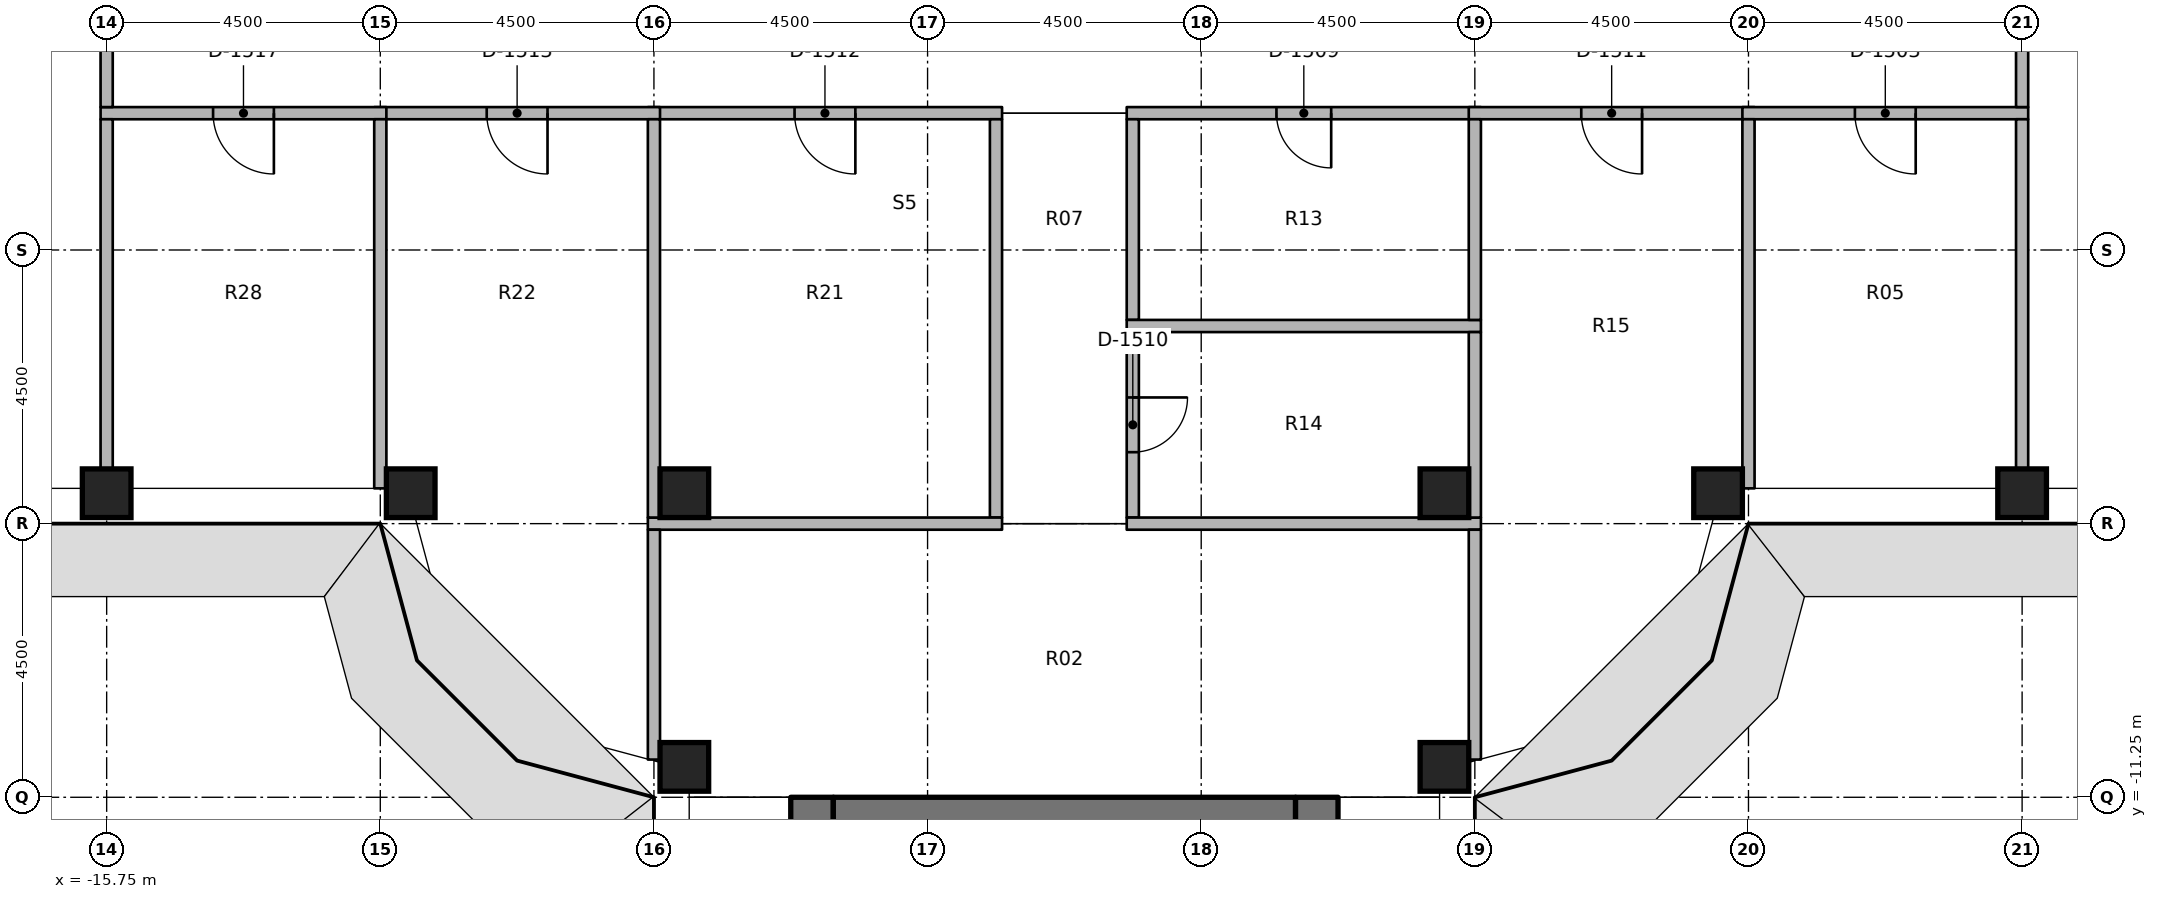
"""IFC4 building model, lengths in metres.
Left out: names, types, materials, properties, quantities, classifications, styles, units other than length and angle.
Written with IfcOpenShell. Run it as: python <this file> out.ifc"""

import sys

from ifc_helpers import new_model, si_unit, direction, frame, frame_2d, origin, origin_2d, place, context, subcontext, project, spatial, rectangle, extrude, element, fill, save


model = new_model("IFC4")
c1 = context("Model", 3, precision=1e-05, world=origin(), true_north=direction((0.0, 1.0)))
c2 = subcontext(c1, "Body", "Model", "MODEL_VIEW")
j1 = project(units=[si_unit("LENGTHUNIT", "METRE"), si_unit("PLANEANGLEUNIT", "RADIAN")], contexts=[c1])
p1 = place(None, origin())
s1 = spatial("IfcSite", under=j1, at=p1, CompositionType="ELEMENT")
p2 = place(p1, origin())
s2 = spatial("IfcBuilding", under=s1, at=p2, CompositionType="ELEMENT")
p3 = place(p2, frame((0.0, 0.0, 144.8)))
s3 = spatial("IfcBuildingStorey", under=s2, at=p3, CompositionType="ELEMENT", Elevation=144.8)
for number, where, z_axis, x_axis in (
    (1, (-15.75, -6.25, 0.0), (0.0, 0.0, 1.0), (1.0, 0.0, 0.0)),
    (2, (-10.75, -6.25, 0.0), (0.0, 0.0, 1.0), (1.0, 0.0, 0.0)),
    (3, (-6.25, -10.75, 0.0), (0.0, 0.0, 1.0), (1.0, 0.0, 0.0)),
    (4, (-6.25, -6.25, 0.0), (0.0, 0.0, 1.0), (1.0, 0.0, 0.0)),
    (5, (6.25, -10.75, 0.0), (0.0, 0.0, 1.0), (1.0, 0.0, 0.0)),
    (6, (6.25, -6.25, 0.0), (0.0, 0.0, 1.0), (1.0, 0.0, 0.0)),
    (7, (10.75, -6.25, 0.0), (0.0, 0.0, 1.0), (1.0, 0.0, 0.0)),
    (8, (15.75, -6.25, 0.0), (0.0, 0.0, 1.0), (1.0, 0.0, 0.0)),
):
    element("IfcColumn", number, at=place(p3, frame(where, z_axis=z_axis, x_axis=x_axis)), inside=s3, PredefinedType="COLUMN", context=c2, shape_type="SweptSolid", body=[
        extrude(rectangle(XDim=0.8, YDim=0.8, at=origin_2d()), origin(), (0.0, 0.0, 1.0), 3.65),
    ])
p4 = place(p3, frame((-4.15, -11.25, 0.0), z_axis=(0.0, 0.0, 1.0), x_axis=(0.0, -1.0, 0.0)))
e9 = element("IfcWall", 9, at=p4, inside=s3, PredefinedType="SHEAR", context=c2, shape_type="SweptSolid", body=[
    extrude(rectangle(XDim=15.0, YDim=0.7, at=frame_2d((7.5, 0.0))), origin(), (0.0, 0.0, 1.0), 3.8),
])
p5 = place(p4, frame((7.15, 0.0, 0.0)))
e10 = element("IfcOpeningElement", 10, at=p5, cuts=e9, PredefinedType="OPENING", context=c2, shape_type="SweptSolid", body=[
    extrude(rectangle(XDim=1.5, YDim=2.3, at=frame_2d((0.75, 1.15))), frame((0.0, 0.36, 0.0), z_axis=(0.0, -1.0, 0.0), x_axis=(1.0, 0.0, 0.0)), (0.0, 0.0, 1.0), 0.72),
])
p6 = place(p4, frame((5.55, 0.0, 0.0)))
e11 = element("IfcOpeningElement", 11, at=p6, cuts=e9, PredefinedType="OPENING", context=c2, shape_type="SweptSolid", body=[
    extrude(rectangle(XDim=1.2, YDim=2.1, at=frame_2d((0.6, 1.05))), frame((0.0, 0.36, 0.0), z_axis=(0.0, -1.0, 0.0), x_axis=(1.0, 0.0, 0.0)), (0.0, 0.0, 1.0), 0.72),
])
p7 = place(p3, frame((4.15, -11.25, 0.0), z_axis=(0.0, 0.0, 1.0), x_axis=(0.0, -1.0, 0.0)))
e12 = element("IfcWall", 12, at=p7, inside=s3, PredefinedType="SHEAR", context=c2, shape_type="SweptSolid", body=[
    extrude(rectangle(XDim=15.0, YDim=0.7, at=frame_2d((7.5, 0.0))), origin(), (0.0, 0.0, 1.0), 3.8),
])
p8 = place(p7, frame((7.15, 0.0, 0.0)))
e13 = element("IfcOpeningElement", 13, at=p8, cuts=e12, PredefinedType="OPENING", context=c2, shape_type="SweptSolid", body=[
    extrude(rectangle(XDim=1.5, YDim=2.3, at=frame_2d((0.75, 1.15))), frame((0.0, 0.36, 0.0), z_axis=(0.0, -1.0, 0.0), x_axis=(1.0, 0.0, 0.0)), (0.0, 0.0, 1.0), 0.72),
])
p9 = place(p7, frame((13.9, 0.0, 0.0)))
e14 = element("IfcOpeningElement", 14, at=p9, cuts=e12, PredefinedType="OPENING", context=c2, shape_type="SweptSolid", body=[
    extrude(rectangle(XDim=0.9, YDim=2.1, at=frame_2d((0.45, 1.05))), frame((0.0, 0.36, 0.0), z_axis=(0.0, -1.0, 0.0), x_axis=(1.0, 0.0, 0.0)), (0.0, 0.0, 1.0), 0.72),
])
p10 = place(p7, frame((1.15, 0.0, 0.0)))
e15 = element("IfcOpeningElement", 15, at=p10, cuts=e12, PredefinedType="OPENING", context=c2, shape_type="SweptSolid", body=[
    extrude(rectangle(XDim=1.2, YDim=2.1, at=frame_2d((0.6, 1.05))), frame((0.0, 0.36, 0.0), z_axis=(0.0, -1.0, 0.0), x_axis=(1.0, 0.0, 0.0)), (0.0, 0.0, 1.0), 0.72),
])
p11 = place(p3, frame((-3.8, -11.6, 0.0), z_axis=(0.0, 0.0, 1.0), x_axis=(1.0, 0.0, 0.0)))
e16 = element("IfcWall", 16, at=p11, inside=s3, PredefinedType="SHEAR", context=c2, shape_type="SweptSolid", body=[
    extrude(rectangle(XDim=7.6, YDim=0.7, at=frame_2d((3.8, 0.0))), origin(), (0.0, 0.0, 1.0), 3.8),
])
p12 = place(p3, frame((6.85, 0.0, 0.0), z_axis=(0.0, 0.0, 1.0), x_axis=(-1.0, 0.0, 0.0)))
e17 = element("IfcWall", 17, at=p12, inside=s3, PredefinedType="PARTITIONING", context=c2, shape_type="SweptSolid", body=[
    extrude(rectangle(XDim=5.825, YDim=0.2, at=frame_2d((2.913, 0.0))), origin(), (0.0, 0.0, 1.0), 2.75),
])
p13 = place(p12, frame((2.462, 0.0, 0.0)))
e18 = element("IfcOpeningElement", 18, at=p13, cuts=e17, PredefinedType="OPENING", context=c2, shape_type="SweptSolid", body=[
    extrude(rectangle(XDim=0.9, YDim=2.1, at=frame_2d((0.45, 1.05))), frame((0.0, 0.11, 0.0), z_axis=(0.0, -1.0, 0.0), x_axis=(1.0, 0.0, 0.0)), (0.0, 0.0, 1.0), 0.22),
])
p14 = place(p3, frame((11.35, 0.0, 0.0), z_axis=(0.0, 0.0, 1.0), x_axis=(-1.0, 0.0, 0.0)))
e19 = element("IfcWall", 19, at=p14, inside=s3, PredefinedType="PARTITIONING", context=c2, shape_type="SweptSolid", body=[
    extrude(rectangle(XDim=4.7, YDim=0.2, at=frame_2d((2.35, 0.0))), origin(), (0.0, 0.0, 1.0), 2.75),
])
p15 = place(p14, frame((1.85, 0.0, 0.0)))
e20 = element("IfcOpeningElement", 20, at=p15, cuts=e19, PredefinedType="OPENING", context=c2, shape_type="SweptSolid", body=[
    extrude(rectangle(XDim=1.0, YDim=2.1, at=frame_2d((0.5, 1.05))), frame((0.0, 0.11, 0.0), z_axis=(0.0, -1.0, 0.0), x_axis=(1.0, 0.0, 0.0)), (0.0, 0.0, 1.0), 0.22),
])
p16 = place(p3, frame((-1.025, 0.0, 0.0), z_axis=(0.0, 0.0, 1.0), x_axis=(-1.0, 0.0, 0.0)))
e21 = element("IfcWall", 21, at=p16, inside=s3, PredefinedType="PARTITIONING", context=c2, shape_type="SweptSolid", body=[
    extrude(rectangle(XDim=5.825, YDim=0.2, at=frame_2d((2.913, 0.0))), origin(), (0.0, 0.0, 1.0), 2.75),
])
p17 = place(p16, frame((2.413, 0.0, 0.0)))
e22 = element("IfcOpeningElement", 22, at=p17, cuts=e21, PredefinedType="OPENING", context=c2, shape_type="SweptSolid", body=[
    extrude(rectangle(XDim=1.0, YDim=2.1, at=frame_2d((0.5, 1.05))), frame((0.0, 0.11, 0.0), z_axis=(0.0, -1.0, 0.0), x_axis=(1.0, 0.0, 0.0)), (0.0, 0.0, 1.0), 0.22),
])
p18 = place(p3, frame((-6.65, 0.0, 0.0), z_axis=(0.0, 0.0, 1.0), x_axis=(-1.0, 0.0, 0.0)))
e23 = element("IfcWall", 23, at=p18, inside=s3, PredefinedType="PARTITIONING", context=c2, shape_type="SweptSolid", body=[
    extrude(rectangle(XDim=4.7, YDim=0.2, at=frame_2d((2.35, 0.0))), origin(), (0.0, 0.0, 1.0), 2.75),
])
p19 = place(p18, frame((1.85, 0.0, 0.0)))
e24 = element("IfcOpeningElement", 24, at=p19, cuts=e23, PredefinedType="OPENING", context=c2, shape_type="SweptSolid", body=[
    extrude(rectangle(XDim=1.0, YDim=2.1, at=frame_2d((0.5, 1.05))), frame((0.0, 0.11, 0.0), z_axis=(0.0, -1.0, 0.0), x_axis=(1.0, 0.0, 0.0)), (0.0, 0.0, 1.0), 0.22),
])
p20 = place(p3, frame((15.85, 0.0, 0.0), z_axis=(0.0, 0.0, 1.0), x_axis=(-1.0, 0.0, 0.0)))
e25 = element("IfcWall", 25, at=p20, inside=s3, PredefinedType="PARTITIONING", context=c2, shape_type="SweptSolid", body=[
    extrude(rectangle(XDim=4.7, YDim=0.2, at=frame_2d((2.35, 0.0))), origin(), (0.0, 0.0, 1.0), 2.75),
])
p21 = place(p20, frame((1.85, 0.0, 0.0)))
e26 = element("IfcOpeningElement", 26, at=p21, cuts=e25, PredefinedType="OPENING", context=c2, shape_type="SweptSolid", body=[
    extrude(rectangle(XDim=1.0, YDim=2.1, at=frame_2d((0.5, 1.05))), frame((0.0, 0.11, 0.0), z_axis=(0.0, -1.0, 0.0), x_axis=(1.0, 0.0, 0.0)), (0.0, 0.0, 1.0), 0.22),
])
p22 = place(p3, frame((15.75, 0.1, 0.0), z_axis=(0.0, 0.0, 1.0), x_axis=(0.0, 1.0, 0.0)))
e27 = element("IfcWall", 27, at=p22, inside=s3, PredefinedType="PARTITIONING", context=c2, shape_type="SweptSolid", body=[
    extrude(rectangle(XDim=2.05, YDim=0.2, at=frame_2d((1.025, 0.0))), origin(), (0.0, 0.0, 1.0), 2.75),
])
p23 = place(p3, frame((-11.15, 0.0, 0.0), z_axis=(0.0, 0.0, 1.0), x_axis=(-1.0, 0.0, 0.0)))
e28 = element("IfcWall", 28, at=p23, inside=s3, PredefinedType="PARTITIONING", context=c2, shape_type="SweptSolid", body=[
    extrude(rectangle(XDim=4.7, YDim=0.2, at=frame_2d((2.35, 0.0))), origin(), (0.0, 0.0, 1.0), 2.75),
])
p24 = place(p23, frame((1.85, 0.0, 0.0)))
e29 = element("IfcOpeningElement", 29, at=p24, cuts=e28, PredefinedType="OPENING", context=c2, shape_type="SweptSolid", body=[
    extrude(rectangle(XDim=1.0, YDim=2.1, at=frame_2d((0.5, 1.05))), frame((0.0, 0.11, 0.0), z_axis=(0.0, -1.0, 0.0), x_axis=(1.0, 0.0, 0.0)), (0.0, 0.0, 1.0), 0.22),
])
p25 = place(p3, frame((-15.75, 0.1, 0.0), z_axis=(0.0, 0.0, 1.0), x_axis=(0.0, 1.0, 0.0)))
e30 = element("IfcWall", 30, at=p25, inside=s3, PredefinedType="PARTITIONING", context=c2, shape_type="SweptSolid", body=[
    extrude(rectangle(XDim=2.05, YDim=0.2, at=frame_2d((1.025, 0.0))), origin(), (0.0, 0.0, 1.0), 2.75),
])
p26 = place(p3, frame((1.125, -3.4, 0.0), z_axis=(0.0, 0.0, 1.0), x_axis=(0.0, 1.0, 0.0)))
e31 = element("IfcWall", 31, at=p26, inside=s3, PredefinedType="PARTITIONING", context=c2, shape_type="SweptSolid", body=[
    extrude(rectangle(XDim=3.3, YDim=0.2, at=frame_2d((1.65, 0.0))), origin(), (0.0, 0.0, 1.0), 2.75),
])
p27 = place(p3, frame((1.125, -3.6, 0.0), z_axis=(0.0, 0.0, 1.0), x_axis=(0.0, -1.0, 0.0)))
e32 = element("IfcWall", 32, at=p27, inside=s3, PredefinedType="PARTITIONING", context=c2, shape_type="SweptSolid", body=[
    extrude(rectangle(XDim=3.05, YDim=0.2, at=frame_2d((1.525, 0.0))), origin(), (0.0, 0.0, 1.0), 2.75),
])
p28 = place(p27, frame((1.075, 0.0, 0.0)))
e33 = element("IfcOpeningElement", 33, at=p28, cuts=e32, PredefinedType="OPENING", context=c2, shape_type="SweptSolid", body=[
    extrude(rectangle(XDim=0.9, YDim=2.1, at=frame_2d((0.45, 1.05))), frame((0.0, 0.11, 0.0), z_axis=(0.0, -1.0, 0.0), x_axis=(1.0, 0.0, 0.0)), (0.0, 0.0, 1.0), 0.22),
])
p29 = place(p3, frame((-1.125, -6.65, 0.0), z_axis=(0.0, 0.0, 1.0), x_axis=(0.0, 1.0, 0.0)))
e34 = element("IfcWall", 34, at=p29, inside=s3, PredefinedType="PARTITIONING", context=c2, shape_type="SweptSolid", body=[
    extrude(rectangle(XDim=6.55, YDim=0.2, at=frame_2d((3.275, 0.0))), origin(), (0.0, 0.0, 1.0), 2.75),
])
p30 = place(p3, frame((1.025, -6.75, 0.0), z_axis=(0.0, 0.0, 1.0), x_axis=(1.0, 0.0, 0.0)))
e35 = element("IfcWall", 35, at=p30, inside=s3, PredefinedType="PARTITIONING", context=c2, shape_type="SweptSolid", body=[
    extrude(rectangle(XDim=5.825, YDim=0.2, at=frame_2d((2.913, 0.0))), origin(), (0.0, 0.0, 1.0), 2.75),
])
p31 = place(p3, frame((6.75, -10.63, 0.0), z_axis=(0.0, 0.0, 1.0), x_axis=(0.0, 1.0, 0.0)))
e36 = element("IfcWall", 36, at=p31, inside=s3, PredefinedType="PARTITIONING", context=c2, shape_type="SweptSolid", body=[
    extrude(rectangle(XDim=3.78, YDim=0.2, at=frame_2d((1.89, 0.0))), origin(), (0.0, 0.0, 1.0), 2.75),
])
p32 = place(p3, frame((-6.85, -6.75, 0.0), z_axis=(0.0, 0.0, 1.0), x_axis=(1.0, 0.0, 0.0)))
e37 = element("IfcWall", 37, at=p32, inside=s3, PredefinedType="PARTITIONING", context=c2, shape_type="SweptSolid", body=[
    extrude(rectangle(XDim=5.825, YDim=0.2, at=frame_2d((2.913, 0.0))), origin(), (0.0, 0.0, 1.0), 2.75),
])
p33 = place(p3, frame((-6.75, -10.63, 0.0), z_axis=(0.0, 0.0, 1.0), x_axis=(0.0, 1.0, 0.0)))
e38 = element("IfcWall", 38, at=p33, inside=s3, PredefinedType="PARTITIONING", context=c2, shape_type="SweptSolid", body=[
    extrude(rectangle(XDim=3.78, YDim=0.2, at=frame_2d((1.89, 0.0))), origin(), (0.0, 0.0, 1.0), 2.75),
])
p34 = place(p3, frame((1.025, -3.5, 0.0), z_axis=(0.0, 0.0, 1.0), x_axis=(1.0, 0.0, 0.0)))
e39 = element("IfcWall", 39, at=p34, inside=s3, PredefinedType="PARTITIONING", context=c2, shape_type="SweptSolid", body=[
    extrude(rectangle(XDim=5.825, YDim=0.2, at=frame_2d((2.913, 0.0))), origin(), (0.0, 0.0, 1.0), 2.75),
])
p35 = place(p3, frame((6.75, -3.4, 0.0), z_axis=(0.0, 0.0, 1.0), x_axis=(0.0, 1.0, 0.0)))
e40 = element("IfcWall", 40, at=p35, inside=s3, PredefinedType="PARTITIONING", context=c2, shape_type="SweptSolid", body=[
    extrude(rectangle(XDim=3.3, YDim=0.2, at=frame_2d((1.65, 0.0))), origin(), (0.0, 0.0, 1.0), 2.75),
])
p36 = place(p3, frame((6.75, -6.65, 0.0), z_axis=(0.0, 0.0, 1.0), x_axis=(0.0, 1.0, 0.0)))
e41 = element("IfcWall", 41, at=p36, inside=s3, PredefinedType="PARTITIONING", context=c2, shape_type="SweptSolid", body=[
    extrude(rectangle(XDim=3.05, YDim=0.2, at=frame_2d((1.525, 0.0))), origin(), (0.0, 0.0, 1.0), 2.75),
])
p37 = place(p3, frame((11.25, -6.17, 0.0), z_axis=(0.0, 0.0, 1.0), x_axis=(0.0, 1.0, 0.0)))
e42 = element("IfcWall", 42, at=p37, inside=s3, PredefinedType="PARTITIONING", context=c2, shape_type="SweptSolid", body=[
    extrude(rectangle(XDim=6.07, YDim=0.2, at=frame_2d((3.035, 0.0))), origin(), (0.0, 0.0, 1.0), 2.75),
])
p38 = place(p3, frame((-6.75, -6.65, 0.0), z_axis=(0.0, 0.0, 1.0), x_axis=(0.0, 1.0, 0.0)))
e43 = element("IfcWall", 43, at=p38, inside=s3, PredefinedType="PARTITIONING", context=c2, shape_type="SweptSolid", body=[
    extrude(rectangle(XDim=6.55, YDim=0.2, at=frame_2d((3.275, 0.0))), origin(), (0.0, 0.0, 1.0), 2.75),
])
p39 = place(p3, frame((-11.25, -6.17, 0.0), z_axis=(0.0, 0.0, 1.0), x_axis=(0.0, 1.0, 0.0)))
e44 = element("IfcWall", 44, at=p39, inside=s3, PredefinedType="PARTITIONING", context=c2, shape_type="SweptSolid", body=[
    extrude(rectangle(XDim=6.07, YDim=0.2, at=frame_2d((3.035, 0.0))), origin(), (0.0, 0.0, 1.0), 2.75),
])
for number, where, z_axis, x_axis in (
    (45, (15.75, -5.85, 0.0), (0.0, 0.0, 1.0), (0.0, 1.0, 0.0)),
    (46, (-15.75, -5.85, 0.0), (0.0, 0.0, 1.0), (0.0, 1.0, 0.0)),
):
    element("IfcWall", number, at=place(p3, frame(where, z_axis=z_axis, x_axis=x_axis)), inside=s3, PredefinedType="PARTITIONING", context=c2, shape_type="SweptSolid", body=[
        extrude(rectangle(XDim=5.75, YDim=0.2, at=frame_2d((2.875, 0.0))), origin(), (0.0, 0.0, 1.0), 2.75),
    ])
p40 = place(p21, origin())
e47 = element("IfcDoor", 47, at=p40, inside=s3, OperationType="SINGLE_SWING_RIGHT", PredefinedType="DOOR", context=c2, shape_type="SweptSolid", body=[
    extrude(rectangle(XDim=1.0, YDim=2.1, at=frame_2d((0.5, 1.05))), frame((0.0, 0.025, 0.0), z_axis=(0.0, -1.0, 0.0), x_axis=(1.0, 0.0, 0.0)), (0.0, 0.0, 1.0), 0.05),
])
fill(e26, e47)
p41 = place(p13, origin())
e48 = element("IfcDoor", 48, at=p41, inside=s3, OperationType="SINGLE_SWING_RIGHT", PredefinedType="DOOR", context=c2, shape_type="SweptSolid", body=[
    extrude(rectangle(XDim=0.9, YDim=2.1, at=frame_2d((0.45, 1.05))), frame((0.0, 0.025, 0.0), z_axis=(0.0, -1.0, 0.0), x_axis=(1.0, 0.0, 0.0)), (0.0, 0.0, 1.0), 0.05),
])
fill(e18, e48)
p42 = place(p28, origin())
e49 = element("IfcDoor", 49, at=p42, inside=s3, OperationType="SINGLE_SWING_LEFT", PredefinedType="DOOR", context=c2, shape_type="SweptSolid", body=[
    extrude(rectangle(XDim=0.9, YDim=2.1, at=frame_2d((0.45, 1.05))), frame((0.0, 0.025, 0.0), z_axis=(0.0, -1.0, 0.0), x_axis=(1.0, 0.0, 0.0)), (0.0, 0.0, 1.0), 0.05),
])
fill(e33, e49)
p43 = place(p15, origin())
e50 = element("IfcDoor", 50, at=p43, inside=s3, OperationType="SINGLE_SWING_RIGHT", PredefinedType="DOOR", context=c2, shape_type="SweptSolid", body=[
    extrude(rectangle(XDim=1.0, YDim=2.1, at=frame_2d((0.5, 1.05))), frame((0.0, 0.025, 0.0), z_axis=(0.0, -1.0, 0.0), x_axis=(1.0, 0.0, 0.0)), (0.0, 0.0, 1.0), 0.05),
])
fill(e20, e50)
p44 = place(p17, origin())
e51 = element("IfcDoor", 51, at=p44, inside=s3, OperationType="SINGLE_SWING_RIGHT", PredefinedType="DOOR", context=c2, shape_type="SweptSolid", body=[
    extrude(rectangle(XDim=1.0, YDim=2.1, at=frame_2d((0.5, 1.05))), frame((0.0, 0.025, 0.0), z_axis=(0.0, -1.0, 0.0), x_axis=(1.0, 0.0, 0.0)), (0.0, 0.0, 1.0), 0.05),
])
fill(e22, e51)
p45 = place(p19, origin())
e52 = element("IfcDoor", 52, at=p45, inside=s3, OperationType="SINGLE_SWING_RIGHT", PredefinedType="DOOR", context=c2, shape_type="SweptSolid", body=[
    extrude(rectangle(XDim=1.0, YDim=2.1, at=frame_2d((0.5, 1.05))), frame((0.0, 0.025, 0.0), z_axis=(0.0, -1.0, 0.0), x_axis=(1.0, 0.0, 0.0)), (0.0, 0.0, 1.0), 0.05),
])
fill(e24, e52)
p46 = place(p24, origin())
e53 = element("IfcDoor", 53, at=p46, inside=s3, OperationType="SINGLE_SWING_RIGHT", PredefinedType="DOOR", context=c2, shape_type="SweptSolid", body=[
    extrude(rectangle(XDim=1.0, YDim=2.1, at=frame_2d((0.5, 1.05))), frame((0.0, 0.025, 0.0), z_axis=(0.0, -1.0, 0.0), x_axis=(1.0, 0.0, 0.0)), (0.0, 0.0, 1.0), 0.05),
])
fill(e29, e53)
save(model, sys.argv[1])
